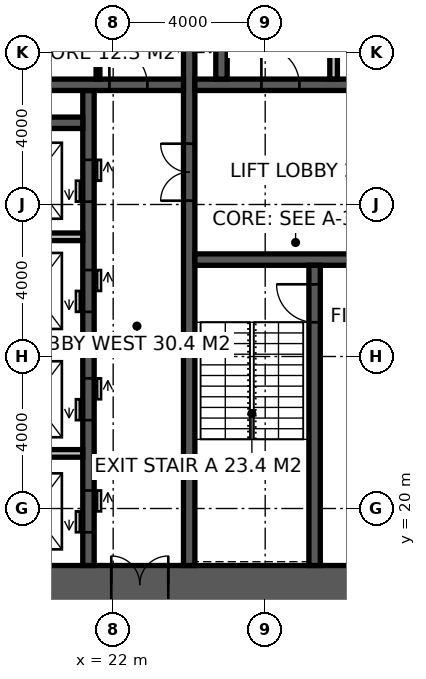
"""IFC4 building model, lengths in metres.
Left out: names, types, materials, properties, quantities, classifications, styles, units other than length and angle.
Written with IfcOpenShell. Run it as: python <this file> out.ifc"""

import sys

from ifc_helpers import new_model, si_unit, direction, frame, frame_2d, origin, place, context, subcontext, project, spatial, rectangle, extrude, element, fill, save


model = new_model("IFC4")
c1 = context("Model", 3, precision=1e-05, world=origin(), true_north=direction((0.0, 1.0)))
c2 = subcontext(c1, "Body", "Model", "MODEL_VIEW")
j1 = project(units=[si_unit("LENGTHUNIT", "METRE"), si_unit("PLANEANGLEUNIT", "RADIAN")], contexts=[c1])
p1 = place(None, origin())
s1 = spatial("IfcSite", under=j1, at=p1, CompositionType="ELEMENT")
p2 = place(p1, origin())
s2 = spatial("IfcBuilding", under=s1, at=p2, CompositionType="ELEMENT")
p3 = place(p2, frame((0.0, 0.0, 274.2)))
s3 = spatial("IfcBuildingStorey", under=s2, at=p3, CompositionType="ELEMENT", Elevation=274.2)
p4 = place(p3, frame((18.5, 18.0, -0.15), z_axis=(0.0, 0.0, 1.0), x_axis=(1.0, 0.0, 0.0)))
e1 = element("IfcWall", 1, at=p4, inside=s3, PredefinedType="SHEAR", context=c2, shape_type="SweptSolid", body=[
    extrude(rectangle(XDim=17.6, YDim=1.0, at=frame_2d((8.8, 0.0))), origin(), (0.0, 0.0, 1.0), 4.0),
])
p5 = place(p4, frame((3.45, 0.0, 0.15)))
e2 = element("IfcOpeningElement", 2, at=p5, cuts=e1, PredefinedType="OPENING", context=c2, shape_type="SweptSolid", body=[
    extrude(rectangle(XDim=1.5, YDim=2.4, at=frame_2d((0.75, 1.2))), frame((0.0, 0.51, 0.0), z_axis=(0.0, -1.0, 0.0), x_axis=(1.0, 0.0, 0.0)), (0.0, 0.0, 1.0), 1.02),
])
p6 = place(p3, frame((24.0, 18.5, -0.15), z_axis=(0.0, 0.0, 1.0), x_axis=(0.0, 1.0, 0.0)))
e3 = element("IfcWall", 3, at=p6, inside=s3, PredefinedType="SHEAR", context=c2, shape_type="SweptSolid", body=[
    extrude(rectangle(XDim=17.0, YDim=0.3, at=frame_2d((8.5, 0.0))), origin(), (0.0, 0.0, 1.0), 4.0),
])
p7 = place(p6, frame((9.6, 0.0, 0.15)))
e4 = element("IfcOpeningElement", 4, at=p7, cuts=e3, PredefinedType="OPENING", context=c2, shape_type="SweptSolid", body=[
    extrude(rectangle(XDim=1.5, YDim=2.4, at=frame_2d((0.75, 1.2))), frame((0.0, 0.16, 0.0), z_axis=(0.0, -1.0, 0.0), x_axis=(1.0, 0.0, 0.0)), (0.0, 0.0, 1.0), 0.32),
])
p8 = place(p3, frame((24.15, 26.55, -0.15), z_axis=(0.0, 0.0, 1.0), x_axis=(1.0, 0.0, 0.0)))
e5 = element("IfcWall", 5, at=p8, inside=s3, PredefinedType="SHEAR", context=c2, shape_type="SweptSolid", body=[
    extrude(rectangle(XDim=11.25, YDim=0.3, at=frame_2d((5.625, 0.0))), origin(), (0.0, 0.0, 1.0), 4.0),
])
p9 = place(p8, frame((9.25, 0.0, 0.15)))
e6 = element("IfcOpeningElement", 6, at=p9, cuts=e5, PredefinedType="OPENING", context=c2, shape_type="SweptSolid", body=[
    extrude(rectangle(XDim=1.0, YDim=2.2, at=frame_2d((0.5, 1.1))), frame((0.0, 0.16, 0.0), z_axis=(0.0, -1.0, 0.0), x_axis=(1.0, 0.0, 0.0)), (0.0, 0.0, 1.0), 0.32),
])
p10 = place(p8, frame((4.9, 0.0, 0.15)))
e7 = element("IfcOpeningElement", 7, at=p10, cuts=e5, PredefinedType="OPENING", context=c2, shape_type="SweptSolid", body=[
    extrude(rectangle(XDim=1.5, YDim=2.4, at=frame_2d((0.75, 1.2))), frame((0.0, 0.16, 0.0), z_axis=(0.0, -1.0, 0.0), x_axis=(1.0, 0.0, 0.0)), (0.0, 0.0, 1.0), 0.32),
])
p11 = place(p3, frame((27.3, 18.5, -0.15), z_axis=(0.0, 0.0, 1.0), x_axis=(0.0, 1.0, 0.0)))
e8 = element("IfcWall", 8, at=p11, inside=s3, PredefinedType="SHEAR", context=c2, shape_type="SweptSolid", body=[
    extrude(rectangle(XDim=7.9, YDim=0.3, at=frame_2d((3.95, 0.0))), origin(), (0.0, 0.0, 1.0), 4.0),
])
p12 = place(p11, frame((6.4, 0.0, 0.15)))
e9 = element("IfcOpeningElement", 9, at=p12, cuts=e8, PredefinedType="OPENING", context=c2, shape_type="SweptSolid", body=[
    extrude(rectangle(XDim=1.0, YDim=2.2, at=frame_2d((0.5, 1.1))), frame((0.0, 0.16, 0.0), z_axis=(0.0, -1.0, 0.0), x_axis=(1.0, 0.0, 0.0)), (0.0, 0.0, 1.0), 0.32),
])
p13 = place(p3, frame((24.15, 31.15, -0.15), z_axis=(0.0, 0.0, 1.0), x_axis=(1.0, 0.0, 0.0)))
e10 = element("IfcWall", 10, at=p13, inside=s3, PredefinedType="SHEAR", context=c2, shape_type="SweptSolid", body=[
    extrude(rectangle(XDim=11.25, YDim=0.3, at=frame_2d((5.625, 0.0))), origin(), (0.0, 0.0, 1.0), 4.0),
])
p14 = place(p13, frame((1.75, 0.0, 0.15)))
e11 = element("IfcOpeningElement", 11, at=p14, cuts=e10, PredefinedType="OPENING", context=c2, shape_type="SweptSolid", body=[
    extrude(rectangle(XDim=1.0, YDim=2.2, at=frame_2d((0.5, 1.1))), frame((0.0, 0.16, 0.0), z_axis=(0.0, -1.0, 0.0), x_axis=(1.0, 0.0, 0.0)), (0.0, 0.0, 1.0), 0.32),
])
p15 = place(p13, frame((4.55, 0.0, 0.15)))
e12 = element("IfcOpeningElement", 12, at=p15, cuts=e10, PredefinedType="OPENING", context=c2, shape_type="SweptSolid", body=[
    extrude(rectangle(XDim=1.0, YDim=2.2, at=frame_2d((0.5, 1.1))), frame((0.0, 0.16, 0.0), z_axis=(0.0, -1.0, 0.0), x_axis=(1.0, 0.0, 0.0)), (0.0, 0.0, 1.0), 0.32),
])
p16 = place(p13, frame((7.25, 0.0, 0.15)))
e13 = element("IfcOpeningElement", 13, at=p16, cuts=e10, PredefinedType="OPENING", context=c2, shape_type="SweptSolid", body=[
    extrude(rectangle(XDim=1.4, YDim=2.4, at=frame_2d((0.7, 1.2))), frame((0.0, 0.16, 0.0), z_axis=(0.0, -1.0, 0.0), x_axis=(1.0, 0.0, 0.0)), (0.0, 0.0, 1.0), 0.32),
])
p17 = place(p3, frame((21.35, 18.5, -0.15), z_axis=(0.0, 0.0, 1.0), x_axis=(0.0, 1.0, 0.0)))
e14 = element("IfcWall", 14, at=p17, inside=s3, PredefinedType="SHEAR", context=c2, shape_type="SweptSolid", body=[
    extrude(rectangle(XDim=12.5, YDim=0.3, at=frame_2d((6.25, 0.0))), origin(), (0.0, 0.0, 1.0), 4.0),
])
p18 = place(p17, frame((0.875, 0.0, 0.15)))
e15 = element("IfcOpeningElement", 15, at=p18, cuts=e14, PredefinedType="OPENING", context=c2, shape_type="SweptSolid", body=[
    extrude(rectangle(XDim=1.1, YDim=2.2, at=frame_2d((0.55, 1.1))), frame((0.0, 0.16, 0.0), z_axis=(0.0, -1.0, 0.0), x_axis=(1.0, 0.0, 0.0)), (0.0, 0.0, 1.0), 0.32),
])
p19 = place(p17, frame((3.825, 0.0, 0.15)))
e16 = element("IfcOpeningElement", 16, at=p19, cuts=e14, PredefinedType="OPENING", context=c2, shape_type="SweptSolid", body=[
    extrude(rectangle(XDim=1.1, YDim=2.2, at=frame_2d((0.55, 1.1))), frame((0.0, 0.16, 0.0), z_axis=(0.0, -1.0, 0.0), x_axis=(1.0, 0.0, 0.0)), (0.0, 0.0, 1.0), 0.32),
])
p20 = place(p17, frame((6.675, 0.0, 0.15)))
e17 = element("IfcOpeningElement", 17, at=p20, cuts=e14, PredefinedType="OPENING", context=c2, shape_type="SweptSolid", body=[
    extrude(rectangle(XDim=1.1, YDim=2.2, at=frame_2d((0.55, 1.1))), frame((0.0, 0.16, 0.0), z_axis=(0.0, -1.0, 0.0), x_axis=(1.0, 0.0, 0.0)), (0.0, 0.0, 1.0), 0.32),
])
p21 = place(p17, frame((9.575, 0.0, 0.15)))
e18 = element("IfcOpeningElement", 18, at=p21, cuts=e14, PredefinedType="OPENING", context=c2, shape_type="SweptSolid", body=[
    extrude(rectangle(XDim=1.1, YDim=2.2, at=frame_2d((0.55, 1.1))), frame((0.0, 0.16, 0.0), z_axis=(0.0, -1.0, 0.0), x_axis=(1.0, 0.0, 0.0)), (0.0, 0.0, 1.0), 0.32),
])
p22 = place(p3, frame((18.5, 31.15, -0.15), z_axis=(0.0, 0.0, 1.0), x_axis=(1.0, 0.0, 0.0)))
e19 = element("IfcWall", 19, at=p22, inside=s3, PredefinedType="SHEAR", context=c2, shape_type="SweptSolid", body=[
    extrude(rectangle(XDim=5.35, YDim=0.3, at=frame_2d((2.675, 0.0))), origin(), (0.0, 0.0, 1.0), 4.0),
])
p23 = place(p22, frame((3.4, 0.0, 0.15)))
e20 = element("IfcOpeningElement", 20, at=p23, cuts=e19, PredefinedType="OPENING", context=c2, shape_type="SweptSolid", body=[
    extrude(rectangle(XDim=1.0, YDim=2.2, at=frame_2d((0.5, 1.1))), frame((0.0, 0.16, 0.0), z_axis=(0.0, -1.0, 0.0), x_axis=(1.0, 0.0, 0.0)), (0.0, 0.0, 1.0), 0.32),
])
p24 = place(p3, frame((18.5, 30.15, -0.15), z_axis=(0.0, 0.0, 1.0), x_axis=(1.0, 0.0, 0.0)))
e21 = element("IfcWall", 21, at=p24, inside=s3, PredefinedType="SHEAR", context=c2, shape_type="SweptSolid", body=[
    extrude(rectangle(XDim=2.7, YDim=0.3, at=frame_2d((1.35, 0.0))), origin(), (0.0, 0.0, 1.0), 4.0),
])
p25 = place(p3, frame((24.85, 31.3, -0.15), z_axis=(0.0, 0.0, 1.0), x_axis=(0.0, 1.0, 0.0)))
e22 = element("IfcWall", 22, at=p25, inside=s3, PredefinedType="SHEAR", context=c2, shape_type="SweptSolid", body=[
    extrude(rectangle(XDim=4.2, YDim=0.3, at=frame_2d((2.1, 0.0))), origin(), (0.0, 0.0, 1.0), 4.0),
])
p26 = place(p3, frame((27.8, 31.3, 0.0), z_axis=(0.0, 0.0, 1.0), x_axis=(0.0, 1.0, 0.0)))
e23 = element("IfcWall", 23, at=p26, inside=s3, PredefinedType="SOLIDWALL", context=c2, shape_type="SweptSolid", body=[
    extrude(rectangle(XDim=2.8, YDim=0.2, at=frame_2d((1.4, 0.0))), origin(), (0.0, 0.0, 1.0), 3.85),
])
for number, where, z_axis, x_axis in (
    (24, (18.5, 21.45, -0.15), (0.0, 0.0, 1.0), (1.0, 0.0, 0.0)),
    (25, (18.5, 24.3, -0.15), (0.0, 0.0, 1.0), (1.0, 0.0, 0.0)),
    (26, (18.5, 27.15, -0.15), (0.0, 0.0, 1.0), (1.0, 0.0, 0.0)),
):
    element("IfcWall", number, at=place(p3, frame(where, z_axis=z_axis, x_axis=x_axis)), inside=s3, PredefinedType="SOLIDWALL", context=c2, shape_type="SweptSolid", body=[
        extrude(rectangle(XDim=2.7, YDim=0.2, at=frame_2d((1.35, 0.0))), origin(), (0.0, 0.0, 1.0), 4.0),
    ])
p27 = place(p3, frame((21.6, 31.3, 0.0), z_axis=(0.0, 0.0, 1.0), x_axis=(0.0, 1.0, 0.0)))
e27 = element("IfcWall", 27, at=p27, inside=s3, PredefinedType="PARTITIONING", context=c2, shape_type="SweptSolid", body=[
    extrude(rectangle(XDim=4.2, YDim=0.1, at=frame_2d((2.1, 0.0))), origin(), (0.0, 0.0, 1.0), 3.85),
])
p28 = place(p27, frame((1.55, 0.0, 0.0)))
e28 = element("IfcOpeningElement", 28, at=p28, cuts=e27, PredefinedType="OPENING", context=c2, shape_type="SweptSolid", body=[
    extrude(rectangle(XDim=1.0, YDim=2.2, at=frame_2d((0.5, 1.1))), frame((0.0, 0.06, 0.0), z_axis=(0.0, -1.0, 0.0), x_axis=(1.0, 0.0, 0.0)), (0.0, 0.0, 1.0), 0.12),
])
p29 = place(p12, origin())
e29 = element("IfcDoor", 29, at=p29, inside=s3, OperationType="SINGLE_SWING_RIGHT", PredefinedType="DOOR", context=c2, shape_type="SweptSolid", body=[
    extrude(rectangle(XDim=1.0, YDim=2.2, at=frame_2d((0.5, 1.1))), frame((0.0, 0.025, 0.0), z_axis=(0.0, -1.0, 0.0), x_axis=(1.0, 0.0, 0.0)), (0.0, 0.0, 1.0), 0.05),
])
fill(e9, e29)
p30 = place(p7, origin())
e30 = element("IfcDoor", 30, at=p30, inside=s3, OperationType="DOUBLE_DOOR_DOUBLE_SWING", PredefinedType="DOOR", context=c2, shape_type="SweptSolid", body=[
    extrude(rectangle(XDim=1.5, YDim=2.4, at=frame_2d((0.75, 1.2))), frame((0.0, 0.025, 0.0), z_axis=(0.0, -1.0, 0.0), x_axis=(1.0, 0.0, 0.0)), (0.0, 0.0, 1.0), 0.05),
])
fill(e4, e30)
p31 = place(p23, origin())
e31 = element("IfcDoor", 31, at=p31, inside=s3, OperationType="SINGLE_SWING_LEFT", PredefinedType="DOOR", context=c2, shape_type="SweptSolid", body=[
    extrude(rectangle(XDim=1.0, YDim=2.2, at=frame_2d((0.5, 1.1))), frame((0.0, 0.025, 0.0), z_axis=(0.0, -1.0, 0.0), x_axis=(1.0, 0.0, 0.0)), (0.0, 0.0, 1.0), 0.05),
])
fill(e20, e31)
p32 = place(p14, origin())
e32 = element("IfcDoor", 32, at=p32, inside=s3, OperationType="SINGLE_SWING_LEFT", PredefinedType="DOOR", context=c2, shape_type="SweptSolid", body=[
    extrude(rectangle(XDim=1.0, YDim=2.2, at=frame_2d((0.5, 1.1))), frame((0.0, 0.025, 0.0), z_axis=(0.0, -1.0, 0.0), x_axis=(1.0, 0.0, 0.0)), (0.0, 0.0, 1.0), 0.05),
])
fill(e11, e32)
p33 = place(p5, origin())
e33 = element("IfcDoor", 33, at=p33, inside=s3, OperationType="DOUBLE_DOOR_DOUBLE_SWING", PredefinedType="DOOR", context=c2, shape_type="SweptSolid", body=[
    extrude(rectangle(XDim=1.5, YDim=2.4, at=frame_2d((0.75, 1.2))), frame((0.0, 0.025, 0.0), z_axis=(0.0, -1.0, 0.0), x_axis=(1.0, 0.0, 0.0)), (0.0, 0.0, 1.0), 0.05),
])
fill(e2, e33)
p34 = place(p18, origin())
e34 = element("IfcDoor", 34, at=p34, inside=s3, OperationType="DOUBLE_DOOR_SLIDING", PredefinedType="DOOR", context=c2, shape_type="SweptSolid", body=[
    extrude(rectangle(XDim=1.1, YDim=2.2, at=frame_2d((0.55, 1.1))), frame((0.0, 0.025, 0.0), z_axis=(0.0, -1.0, 0.0), x_axis=(1.0, 0.0, 0.0)), (0.0, 0.0, 1.0), 0.05),
])
fill(e15, e34)
p35 = place(p19, origin())
e35 = element("IfcDoor", 35, at=p35, inside=s3, OperationType="DOUBLE_DOOR_SLIDING", PredefinedType="DOOR", context=c2, shape_type="SweptSolid", body=[
    extrude(rectangle(XDim=1.1, YDim=2.2, at=frame_2d((0.55, 1.1))), frame((0.0, 0.025, 0.0), z_axis=(0.0, -1.0, 0.0), x_axis=(1.0, 0.0, 0.0)), (0.0, 0.0, 1.0), 0.05),
])
fill(e16, e35)
p36 = place(p20, origin())
e36 = element("IfcDoor", 36, at=p36, inside=s3, OperationType="DOUBLE_DOOR_SLIDING", PredefinedType="DOOR", context=c2, shape_type="SweptSolid", body=[
    extrude(rectangle(XDim=1.1, YDim=2.2, at=frame_2d((0.55, 1.1))), frame((0.0, 0.025, 0.0), z_axis=(0.0, -1.0, 0.0), x_axis=(1.0, 0.0, 0.0)), (0.0, 0.0, 1.0), 0.05),
])
fill(e17, e36)
p37 = place(p21, origin())
e37 = element("IfcDoor", 37, at=p37, inside=s3, OperationType="DOUBLE_DOOR_SLIDING", PredefinedType="DOOR", context=c2, shape_type="SweptSolid", body=[
    extrude(rectangle(XDim=1.1, YDim=2.2, at=frame_2d((0.55, 1.1))), frame((0.0, 0.025, 0.0), z_axis=(0.0, -1.0, 0.0), x_axis=(1.0, 0.0, 0.0)), (0.0, 0.0, 1.0), 0.05),
])
fill(e18, e37)
save(model, sys.argv[1])
